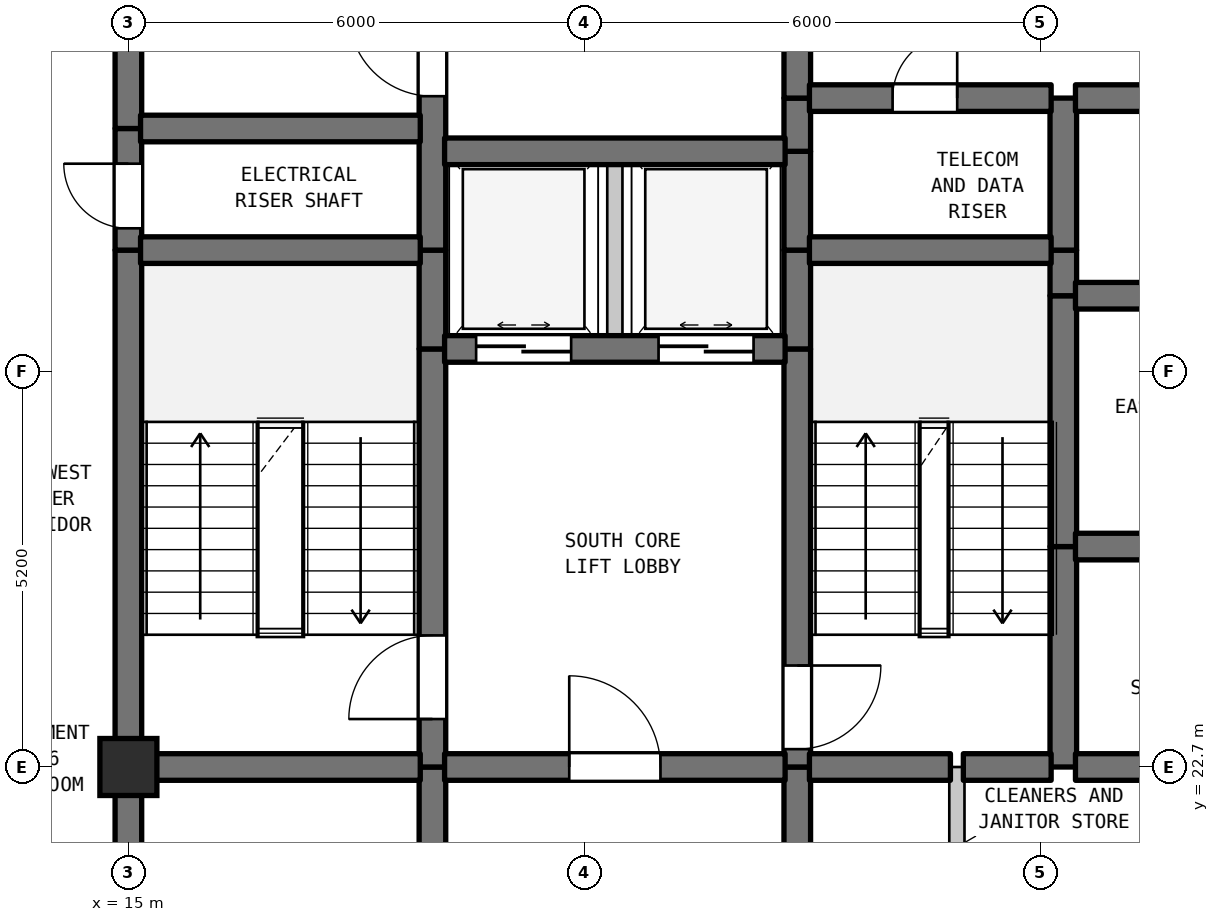
"""IFC4 building model, lengths in metres.
Left out: names, types, materials, properties, quantities, classifications, styles, units other than length and angle.
Written with IfcOpenShell. Run it as: python <this file> out.ifc"""

import sys

from ifc_helpers import new_model, si_unit, direction, frame, frame_2d, origin, origin_2d, place, context, subcontext, project, spatial, rectangle, extrude, element, fill, save


model = new_model("IFC4")
c1 = context("Model", 3, precision=1e-05, world=origin(), true_north=direction((0.0, 1.0)))
c2 = subcontext(c1, "Body", "Model", "MODEL_VIEW")
j1 = project(units=[si_unit("LENGTHUNIT", "METRE"), si_unit("PLANEANGLEUNIT", "RADIAN")], contexts=[c1])
p1 = place(None, origin())
s1 = spatial("IfcSite", under=j1, at=p1, CompositionType="ELEMENT")
p2 = place(p1, origin())
s2 = spatial("IfcBuilding", under=s1, at=p2, CompositionType="ELEMENT")
p3 = place(p2, frame((0.0, 0.0, 233.9)))
s3 = spatial("IfcBuildingStorey", under=s2, at=p3, CompositionType="ELEMENT", Elevation=233.9)
p4 = place(p3, frame((15.0, 22.7, 0.0), z_axis=(0.0, 0.0, 1.0), x_axis=(1.0, 0.0, 0.0)))
e1 = element("IfcColumn", 1, at=p4, inside=s3, PredefinedType="COLUMN", context=c2, shape_type="SweptSolid", body=[
    extrude(rectangle(XDim=0.75, YDim=0.75, at=origin_2d()), origin(), (0.0, 0.0, 1.0), 3.7),
])
p5 = place(p3, frame((15.0, 19.5, 0.0), z_axis=(0.0, 0.0, 1.0), x_axis=(0.0, 1.0, 0.0)))
e2 = element("IfcWall", 2, at=p5, inside=s3, PredefinedType="SHEAR", context=c2, shape_type="SweptSolid", body=[
    extrude(rectangle(XDim=3.2, YDim=0.35, at=frame_2d((1.6, 0.0))), origin(), (0.0, 0.0, 1.0), 3.28),
])
p6 = place(p3, frame((15.0, 22.7, 0.0), z_axis=(0.0, 0.0, 1.0), x_axis=(0.0, 1.0, 0.0)))
e3 = element("IfcWall", 3, at=p6, inside=s3, PredefinedType="SHEAR", context=c2, shape_type="SweptSolid", body=[
    extrude(rectangle(XDim=6.8, YDim=0.35, at=frame_2d((3.4, 0.0))), origin(), (0.0, 0.0, 1.0), 3.28),
])
p7 = place(p3, frame((15.0, 29.5, 0.0), z_axis=(0.0, 0.0, 1.0), x_axis=(0.0, 1.0, 0.0)))
e4 = element("IfcWall", 4, at=p7, inside=s3, PredefinedType="SHEAR", context=c2, shape_type="SweptSolid", body=[
    extrude(rectangle(XDim=1.6, YDim=0.35, at=frame_2d((0.8, 0.0))), origin(), (0.0, 0.0, 1.0), 3.28),
])
p8 = place(p7, frame((0.287, 0.0, 0.0)))
e5 = element("IfcOpeningElement", 5, at=p8, cuts=e4, PredefinedType="OPENING", context=c2, shape_type="SweptSolid", body=[
    extrude(rectangle(XDim=0.85, YDim=2.1, at=frame_2d((0.425, 1.05))), frame((0.0, 0.185, 0.0), z_axis=(0.0, -1.0, 0.0), x_axis=(1.0, 0.0, 0.0)), (0.0, 0.0, 1.0), 0.37),
])
p9 = place(p3, frame((15.0, 31.1, 0.0), z_axis=(0.0, 0.0, 1.0), x_axis=(0.0, 1.0, 0.0)))
e6 = element("IfcWall", 6, at=p9, inside=s3, PredefinedType="SHEAR", context=c2, shape_type="SweptSolid", body=[
    extrude(rectangle(XDim=6.8, YDim=0.35, at=frame_2d((3.4, 0.0))), origin(), (0.0, 0.0, 1.0), 3.28),
])
p10 = place(p3, frame((19.0, 19.5, 0.0), z_axis=(0.0, 0.0, 1.0), x_axis=(0.0, 1.0, 0.0)))
e7 = element("IfcWall", 7, at=p10, inside=s3, PredefinedType="SHEAR", context=c2, shape_type="SweptSolid", body=[
    extrude(rectangle(XDim=3.2, YDim=0.35, at=frame_2d((1.6, 0.0))), origin(), (0.0, 0.0, 1.0), 3.28),
])
p11 = place(p3, frame((19.0, 22.7, 0.0), z_axis=(0.0, 0.0, 1.0), x_axis=(0.0, 1.0, 0.0)))
e8 = element("IfcWall", 8, at=p11, inside=s3, PredefinedType="SHEAR", context=c2, shape_type="SweptSolid", body=[
    extrude(rectangle(XDim=5.5, YDim=0.35, at=frame_2d((2.75, 0.0))), origin(), (0.0, 0.0, 1.0), 3.28),
])
p12 = place(p11, frame((0.631, 0.0, 0.0)))
e9 = element("IfcOpeningElement", 9, at=p12, cuts=e8, PredefinedType="OPENING", context=c2, shape_type="SweptSolid", body=[
    extrude(rectangle(XDim=1.1, YDim=2.15, at=frame_2d((0.55, 1.075))), frame((0.0, 0.185, 0.0), z_axis=(0.0, -1.0, 0.0), x_axis=(1.0, 0.0, 0.0)), (0.0, 0.0, 1.0), 0.37),
])
p13 = place(p3, frame((19.0, 28.2, 0.0), z_axis=(0.0, 0.0, 1.0), x_axis=(0.0, 1.0, 0.0)))
e10 = element("IfcWall", 10, at=p13, inside=s3, PredefinedType="SHEAR", context=c2, shape_type="SweptSolid", body=[
    extrude(rectangle(XDim=1.3, YDim=0.35, at=frame_2d((0.65, 0.0))), origin(), (0.0, 0.0, 1.0), 3.28),
])
p14 = place(p3, frame((19.0, 29.5, 0.0), z_axis=(0.0, 0.0, 1.0), x_axis=(0.0, 1.0, 0.0)))
e11 = element("IfcWall", 11, at=p14, inside=s3, PredefinedType="SHEAR", context=c2, shape_type="SweptSolid", body=[
    extrude(rectangle(XDim=5.5, YDim=0.35, at=frame_2d((2.75, 0.0))), origin(), (0.0, 0.0, 1.0), 3.28),
])
p15 = place(p14, frame((2.025, 0.0, 0.0)))
e12 = element("IfcOpeningElement", 12, at=p15, cuts=e11, PredefinedType="OPENING", context=c2, shape_type="SweptSolid", body=[
    extrude(rectangle(XDim=1.1, YDim=2.15, at=frame_2d((0.55, 1.075))), frame((0.0, 0.185, 0.0), z_axis=(0.0, -1.0, 0.0), x_axis=(1.0, 0.0, 0.0)), (0.0, 0.0, 1.0), 0.37),
])
p16 = place(p3, frame((21.4, 28.2, 0.0), z_axis=(0.0, 0.0, 1.0), x_axis=(0.0, 1.0, 0.0)))
e13 = element("IfcWall", 13, at=p16, inside=s3, PredefinedType="STANDARD", context=c2, shape_type="SweptSolid", body=[
    extrude(rectangle(XDim=2.6, YDim=0.2, at=frame_2d((1.3, 0.0))), origin(), (0.0, 0.0, 1.0), 3.28),
])
p17 = place(p3, frame((23.8, 19.5, 0.0), z_axis=(0.0, 0.0, 1.0), x_axis=(0.0, 1.0, 0.0)))
e14 = element("IfcWall", 14, at=p17, inside=s3, PredefinedType="SHEAR", context=c2, shape_type="SweptSolid", body=[
    extrude(rectangle(XDim=3.2, YDim=0.35, at=frame_2d((1.6, 0.0))), origin(), (0.0, 0.0, 1.0), 3.28),
])
p18 = place(p3, frame((23.8, 22.7, 0.0), z_axis=(0.0, 0.0, 1.0), x_axis=(0.0, 1.0, 0.0)))
e15 = element("IfcWall", 15, at=p18, inside=s3, PredefinedType="SHEAR", context=c2, shape_type="SweptSolid", body=[
    extrude(rectangle(XDim=5.5, YDim=0.35, at=frame_2d((2.75, 0.0))), origin(), (0.0, 0.0, 1.0), 3.28),
])
p19 = place(p18, frame((0.235, 0.0, 0.0)))
e16 = element("IfcOpeningElement", 16, at=p19, cuts=e15, PredefinedType="OPENING", context=c2, shape_type="SweptSolid", body=[
    extrude(rectangle(XDim=1.1, YDim=2.15, at=frame_2d((0.55, 1.075))), frame((0.0, 0.185, 0.0), z_axis=(0.0, -1.0, 0.0), x_axis=(1.0, 0.0, 0.0)), (0.0, 0.0, 1.0), 0.37),
])
for number, where, z_axis, x_axis in (
    (17, (23.8, 28.2, 0.0), (0.0, 0.0, 1.0), (0.0, 1.0, 0.0)),
    (18, (23.8, 29.5, 0.0), (0.0, 0.0, 1.0), (0.0, 1.0, 0.0)),
):
    element("IfcWall", number, at=place(p3, frame(where, z_axis=z_axis, x_axis=x_axis)), inside=s3, PredefinedType="SHEAR", context=c2, shape_type="SweptSolid", body=[
        extrude(rectangle(XDim=1.3, YDim=0.35, at=frame_2d((0.65, 0.0))), origin(), (0.0, 0.0, 1.0), 3.28),
    ])
p20 = place(p3, frame((23.8, 30.8, 0.0), z_axis=(0.0, 0.0, 1.0), x_axis=(0.0, 1.0, 0.0)))
e19 = element("IfcWall", 19, at=p20, inside=s3, PredefinedType="SHEAR", context=c2, shape_type="SweptSolid", body=[
    extrude(rectangle(XDim=0.7, YDim=0.35, at=frame_2d((0.35, 0.0))), origin(), (0.0, 0.0, 1.0), 3.28),
])
p21 = place(p3, frame((23.8, 31.5, 0.0), z_axis=(0.0, 0.0, 1.0), x_axis=(0.0, 1.0, 0.0)))
e20 = element("IfcWall", 20, at=p21, inside=s3, PredefinedType="SHEAR", context=c2, shape_type="SweptSolid", body=[
    extrude(rectangle(XDim=3.5, YDim=0.35, at=frame_2d((1.75, 0.0))), origin(), (0.0, 0.0, 1.0), 3.28),
])
p22 = place(p21, frame((1.127, 0.0, 0.0)))
e21 = element("IfcOpeningElement", 21, at=p22, cuts=e20, PredefinedType="OPENING", context=c2, shape_type="SweptSolid", body=[
    extrude(rectangle(XDim=1.1, YDim=2.15, at=frame_2d((0.55, 1.075))), frame((0.0, 0.185, 0.0), z_axis=(0.0, -1.0, 0.0), x_axis=(1.0, 0.0, 0.0)), (0.0, 0.0, 1.0), 0.37),
])
p23 = place(p3, frame((25.9, 19.5, 0.0), z_axis=(0.0, 0.0, 1.0), x_axis=(0.0, 1.0, 0.0)))
e22 = element("IfcWall", 22, at=p23, inside=s3, PredefinedType="STANDARD", context=c2, shape_type="SweptSolid", body=[
    extrude(rectangle(XDim=3.2, YDim=0.2, at=frame_2d((1.6, 0.0))), origin(), (0.0, 0.0, 1.0), 3.28),
])
p24 = place(p3, frame((27.3, 22.7, 0.0), z_axis=(0.0, 0.0, 1.0), x_axis=(0.0, 1.0, 0.0)))
e23 = element("IfcWall", 23, at=p24, inside=s3, PredefinedType="SHEAR", context=c2, shape_type="SweptSolid", body=[
    extrude(rectangle(XDim=2.9, YDim=0.35, at=frame_2d((1.45, 0.0))), origin(), (0.0, 0.0, 1.0), 3.28),
])
p25 = place(p3, frame((27.3, 25.6, 0.0), z_axis=(0.0, 0.0, 1.0), x_axis=(0.0, 1.0, 0.0)))
e24 = element("IfcWall", 24, at=p25, inside=s3, PredefinedType="SHEAR", context=c2, shape_type="SweptSolid", body=[
    extrude(rectangle(XDim=3.3, YDim=0.35, at=frame_2d((1.65, 0.0))), origin(), (0.0, 0.0, 1.0), 3.28),
])
p26 = place(p3, frame((27.3, 28.9, 0.0), z_axis=(0.0, 0.0, 1.0), x_axis=(0.0, 1.0, 0.0)))
e25 = element("IfcWall", 25, at=p26, inside=s3, PredefinedType="SHEAR", context=c2, shape_type="SweptSolid", body=[
    extrude(rectangle(XDim=0.6, YDim=0.35, at=frame_2d((0.3, 0.0))), origin(), (0.0, 0.0, 1.0), 3.28),
])
p27 = place(p3, frame((27.3, 29.5, 0.0), z_axis=(0.0, 0.0, 1.0), x_axis=(0.0, 1.0, 0.0)))
e26 = element("IfcWall", 26, at=p27, inside=s3, PredefinedType="SHEAR", context=c2, shape_type="SweptSolid", body=[
    extrude(rectangle(XDim=2.0, YDim=0.35, at=frame_2d((1.0, 0.0))), origin(), (0.0, 0.0, 1.0), 3.28),
])
p28 = place(p3, frame((15.16, 22.7, 0.0), z_axis=(0.0, 0.0, 1.0), x_axis=(1.0, 0.0, 0.0)))
e27 = element("IfcWall", 27, at=p28, inside=s3, PredefinedType="SHEAR", context=c2, shape_type="SweptSolid", body=[
    extrude(rectangle(XDim=3.68, YDim=0.35, at=frame_2d((1.84, 0.0))), origin(), (0.0, 0.0, 1.0), 3.28),
])
p29 = place(p3, frame((19.16, 22.7, 0.0), z_axis=(0.0, 0.0, 1.0), x_axis=(1.0, 0.0, 0.0)))
e28 = element("IfcWall", 28, at=p29, inside=s3, PredefinedType="SHEAR", context=c2, shape_type="SweptSolid", body=[
    extrude(rectangle(XDim=4.48, YDim=0.35, at=frame_2d((2.24, 0.0))), origin(), (0.0, 0.0, 1.0), 3.28),
])
p30 = place(p29, frame((1.64, 0.0, 0.0)))
e29 = element("IfcOpeningElement", 29, at=p30, cuts=e28, PredefinedType="OPENING", context=c2, shape_type="SweptSolid", body=[
    extrude(rectangle(XDim=1.2, YDim=2.2, at=frame_2d((0.6, 1.1))), frame((0.0, 0.185, 0.0), z_axis=(0.0, -1.0, 0.0), x_axis=(1.0, 0.0, 0.0)), (0.0, 0.0, 1.0), 0.37),
])
p31 = place(p3, frame((23.96, 22.7, 0.0), z_axis=(0.0, 0.0, 1.0), x_axis=(1.0, 0.0, 0.0)))
e30 = element("IfcWall", 30, at=p31, inside=s3, PredefinedType="SHEAR", context=c2, shape_type="SweptSolid", body=[
    extrude(rectangle(XDim=1.855, YDim=0.35, at=frame_2d((0.927, 0.0))), origin(), (0.0, 0.0, 1.0), 3.28),
])
p32 = place(p3, frame((25.985, 22.7, 0.0), z_axis=(0.0, 0.0, 1.0), x_axis=(1.0, 0.0, 0.0)))
e31 = element("IfcWall", 31, at=p32, inside=s3, PredefinedType="SHEAR", context=c2, shape_type="SweptSolid", body=[
    extrude(rectangle(XDim=1.155, YDim=0.35, at=frame_2d((0.577, 0.0))), origin(), (0.0, 0.0, 1.0), 3.28),
])
p33 = place(p3, frame((27.46, 22.7, 0.0), z_axis=(0.0, 0.0, 1.0), x_axis=(1.0, 0.0, 0.0)))
e32 = element("IfcWall", 32, at=p33, inside=s3, PredefinedType="SHEAR", context=c2, shape_type="SweptSolid", body=[
    extrude(rectangle(XDim=3.18, YDim=0.35, at=frame_2d((1.59, 0.0))), origin(), (0.0, 0.0, 1.0), 3.28),
])
p34 = place(p3, frame((27.46, 25.6, 0.0), z_axis=(0.0, 0.0, 1.0), x_axis=(1.0, 0.0, 0.0)))
e33 = element("IfcWall", 33, at=p34, inside=s3, PredefinedType="SHEAR", context=c2, shape_type="SweptSolid", body=[
    extrude(rectangle(XDim=3.18, YDim=0.35, at=frame_2d((1.59, 0.0))), origin(), (0.0, 0.0, 1.0), 3.28),
])
p35 = place(p34, frame((1.115, 0.0, 0.0)))
e34 = element("IfcOpeningElement", 34, at=p35, cuts=e33, PredefinedType="OPENING", context=c2, shape_type="SweptSolid", body=[
    extrude(rectangle(XDim=0.95, YDim=2.15, at=frame_2d((0.475, 1.075))), frame((0.0, 0.185, 0.0), z_axis=(0.0, -1.0, 0.0), x_axis=(1.0, 0.0, 0.0)), (0.0, 0.0, 1.0), 0.37),
])
p36 = place(p3, frame((19.16, 28.2, 0.0), z_axis=(0.0, 0.0, 1.0), x_axis=(1.0, 0.0, 0.0)))
e35 = element("IfcWall", 35, at=p36, inside=s3, PredefinedType="SHEAR", context=c2, shape_type="SweptSolid", body=[
    extrude(rectangle(XDim=4.48, YDim=0.35, at=frame_2d((2.24, 0.0))), origin(), (0.0, 0.0, 1.0), 3.28),
])
p37 = place(p36, frame((0.415, 0.0, 0.0)))
e36 = element("IfcOpeningElement", 36, at=p37, cuts=e35, PredefinedType="OPENING", context=c2, shape_type="SweptSolid", body=[
    extrude(rectangle(XDim=1.25, YDim=2.2, at=frame_2d((0.625, 1.1))), frame((0.0, 0.185, 0.0), z_axis=(0.0, -1.0, 0.0), x_axis=(1.0, 0.0, 0.0)), (0.0, 0.0, 1.0), 0.37),
])
p38 = place(p36, frame((2.815, 0.0, 0.0)))
e37 = element("IfcOpeningElement", 37, at=p38, cuts=e35, PredefinedType="OPENING", context=c2, shape_type="SweptSolid", body=[
    extrude(rectangle(XDim=1.25, YDim=2.2, at=frame_2d((0.625, 1.1))), frame((0.0, 0.185, 0.0), z_axis=(0.0, -1.0, 0.0), x_axis=(1.0, 0.0, 0.0)), (0.0, 0.0, 1.0), 0.37),
])
p39 = place(p3, frame((27.46, 28.9, 0.0), z_axis=(0.0, 0.0, 1.0), x_axis=(1.0, 0.0, 0.0)))
e38 = element("IfcWall", 38, at=p39, inside=s3, PredefinedType="SHEAR", context=c2, shape_type="SweptSolid", body=[
    extrude(rectangle(XDim=3.18, YDim=0.35, at=frame_2d((1.59, 0.0))), origin(), (0.0, 0.0, 1.0), 3.28),
])
p40 = place(p39, frame((1.115, 0.0, 0.0)))
e39 = element("IfcOpeningElement", 39, at=p40, cuts=e38, PredefinedType="OPENING", context=c2, shape_type="SweptSolid", body=[
    extrude(rectangle(XDim=0.95, YDim=2.15, at=frame_2d((0.475, 1.075))), frame((0.0, 0.185, 0.0), z_axis=(0.0, -1.0, 0.0), x_axis=(1.0, 0.0, 0.0)), (0.0, 0.0, 1.0), 0.37),
])
p41 = place(p3, frame((15.16, 29.5, 0.0), z_axis=(0.0, 0.0, 1.0), x_axis=(1.0, 0.0, 0.0)))
e40 = element("IfcWall", 40, at=p41, inside=s3, PredefinedType="SHEAR", context=c2, shape_type="SweptSolid", body=[
    extrude(rectangle(XDim=3.68, YDim=0.35, at=frame_2d((1.84, 0.0))), origin(), (0.0, 0.0, 1.0), 3.28),
])
p42 = place(p3, frame((23.96, 29.5, 0.0), z_axis=(0.0, 0.0, 1.0), x_axis=(1.0, 0.0, 0.0)))
e41 = element("IfcWall", 41, at=p42, inside=s3, PredefinedType="SHEAR", context=c2, shape_type="SweptSolid", body=[
    extrude(rectangle(XDim=3.18, YDim=0.35, at=frame_2d((1.59, 0.0))), origin(), (0.0, 0.0, 1.0), 3.28),
])
p43 = place(p3, frame((19.16, 30.8, 0.0), z_axis=(0.0, 0.0, 1.0), x_axis=(1.0, 0.0, 0.0)))
e42 = element("IfcWall", 42, at=p43, inside=s3, PredefinedType="SHEAR", context=c2, shape_type="SweptSolid", body=[
    extrude(rectangle(XDim=4.48, YDim=0.35, at=frame_2d((2.24, 0.0))), origin(), (0.0, 0.0, 1.0), 3.28),
])
p44 = place(p3, frame((15.16, 31.1, 0.0), z_axis=(0.0, 0.0, 1.0), x_axis=(1.0, 0.0, 0.0)))
e43 = element("IfcWall", 43, at=p44, inside=s3, PredefinedType="SHEAR", context=c2, shape_type="SweptSolid", body=[
    extrude(rectangle(XDim=3.68, YDim=0.35, at=frame_2d((1.84, 0.0))), origin(), (0.0, 0.0, 1.0), 3.28),
])
p45 = place(p3, frame((23.96, 31.5, 0.0), z_axis=(0.0, 0.0, 1.0), x_axis=(1.0, 0.0, 0.0)))
e44 = element("IfcWall", 44, at=p45, inside=s3, PredefinedType="SHEAR", context=c2, shape_type="SweptSolid", body=[
    extrude(rectangle(XDim=3.18, YDim=0.35, at=frame_2d((1.59, 0.0))), origin(), (0.0, 0.0, 1.0), 3.28),
])
p46 = place(p45, frame((1.094, 0.0, 0.0)))
e45 = element("IfcOpeningElement", 45, at=p46, cuts=e44, PredefinedType="OPENING", context=c2, shape_type="SweptSolid", body=[
    extrude(rectangle(XDim=0.85, YDim=2.1, at=frame_2d((0.425, 1.05))), frame((0.0, 0.185, 0.0), z_axis=(0.0, -1.0, 0.0), x_axis=(1.0, 0.0, 0.0)), (0.0, 0.0, 1.0), 0.37),
])
p47 = place(p3, frame((27.46, 31.5, 0.0), z_axis=(0.0, 0.0, 1.0), x_axis=(1.0, 0.0, 0.0)))
e46 = element("IfcWall", 46, at=p47, inside=s3, PredefinedType="SHEAR", context=c2, shape_type="SweptSolid", body=[
    extrude(rectangle(XDim=3.18, YDim=0.35, at=frame_2d((1.59, 0.0))), origin(), (0.0, 0.0, 1.0), 3.28),
])
p48 = place(p8, origin())
e47 = element("IfcDoor", 47, at=p48, inside=s3, OperationType="SINGLE_SWING_RIGHT", PredefinedType="DOOR", context=c2, shape_type="SweptSolid", body=[
    extrude(rectangle(XDim=0.85, YDim=2.1, at=frame_2d((0.425, 1.05))), frame((0.0, 0.025, 0.0), z_axis=(0.0, -1.0, 0.0), x_axis=(1.0, 0.0, 0.0)), (0.0, 0.0, 1.0), 0.05),
])
fill(e5, e47)
p49 = place(p12, origin())
e48 = element("IfcDoor", 48, at=p49, inside=s3, OperationType="SINGLE_SWING_LEFT", PredefinedType="DOOR", context=c2, shape_type="SweptSolid", body=[
    extrude(rectangle(XDim=1.1, YDim=2.15, at=frame_2d((0.55, 1.075))), frame((0.0, 0.025, 0.0), z_axis=(0.0, -1.0, 0.0), x_axis=(1.0, 0.0, 0.0)), (0.0, 0.0, 1.0), 0.05),
])
fill(e9, e48)
p50 = place(p15, origin())
e49 = element("IfcDoor", 49, at=p50, inside=s3, OperationType="SINGLE_SWING_RIGHT", PredefinedType="DOOR", context=c2, shape_type="SweptSolid", body=[
    extrude(rectangle(XDim=1.1, YDim=2.15, at=frame_2d((0.55, 1.075))), frame((0.0, 0.025, 0.0), z_axis=(0.0, -1.0, 0.0), x_axis=(1.0, 0.0, 0.0)), (0.0, 0.0, 1.0), 0.05),
])
fill(e12, e49)
p51 = place(p19, frame((1.1, 0.0, 0.0), z_axis=(0.0, 0.0, 1.0), x_axis=(-1.0, 0.0, 0.0)))
e50 = element("IfcDoor", 50, at=p51, inside=s3, OperationType="SINGLE_SWING_RIGHT", PredefinedType="DOOR", context=c2, shape_type="SweptSolid", body=[
    extrude(rectangle(XDim=1.1, YDim=2.15, at=frame_2d((0.55, 1.075))), frame((0.0, 0.025, 0.0), z_axis=(0.0, -1.0, 0.0), x_axis=(1.0, 0.0, 0.0)), (0.0, 0.0, 1.0), 0.05),
])
fill(e16, e50)
p52 = place(p30, origin())
e51 = element("IfcDoor", 51, at=p52, inside=s3, OperationType="SINGLE_SWING_LEFT", PredefinedType="DOOR", context=c2, shape_type="SweptSolid", body=[
    extrude(rectangle(XDim=1.2, YDim=2.2, at=frame_2d((0.6, 1.1))), frame((0.0, 0.025, 0.0), z_axis=(0.0, -1.0, 0.0), x_axis=(1.0, 0.0, 0.0)), (0.0, 0.0, 1.0), 0.05),
])
fill(e29, e51)
p53 = place(p37, origin())
e52 = element("IfcDoor", 52, at=p53, inside=s3, OperationType="DOUBLE_DOOR_SLIDING", PredefinedType="DOOR", context=c2, shape_type="SweptSolid", body=[
    extrude(rectangle(XDim=1.25, YDim=2.2, at=frame_2d((0.625, 1.1))), frame((0.0, 0.025, 0.0), z_axis=(0.0, -1.0, 0.0), x_axis=(1.0, 0.0, 0.0)), (0.0, 0.0, 1.0), 0.05),
])
fill(e36, e52)
p54 = place(p38, origin())
e53 = element("IfcDoor", 53, at=p54, inside=s3, OperationType="DOUBLE_DOOR_SLIDING", PredefinedType="DOOR", context=c2, shape_type="SweptSolid", body=[
    extrude(rectangle(XDim=1.25, YDim=2.2, at=frame_2d((0.625, 1.1))), frame((0.0, 0.025, 0.0), z_axis=(0.0, -1.0, 0.0), x_axis=(1.0, 0.0, 0.0)), (0.0, 0.0, 1.0), 0.05),
])
fill(e37, e53)
p55 = place(p46, origin())
e54 = element("IfcDoor", 54, at=p55, inside=s3, OperationType="SINGLE_SWING_RIGHT", PredefinedType="DOOR", context=c2, shape_type="SweptSolid", body=[
    extrude(rectangle(XDim=0.85, YDim=2.1, at=frame_2d((0.425, 1.05))), frame((0.0, 0.025, 0.0), z_axis=(0.0, -1.0, 0.0), x_axis=(1.0, 0.0, 0.0)), (0.0, 0.0, 1.0), 0.05),
])
fill(e45, e54)
save(model, sys.argv[1])
